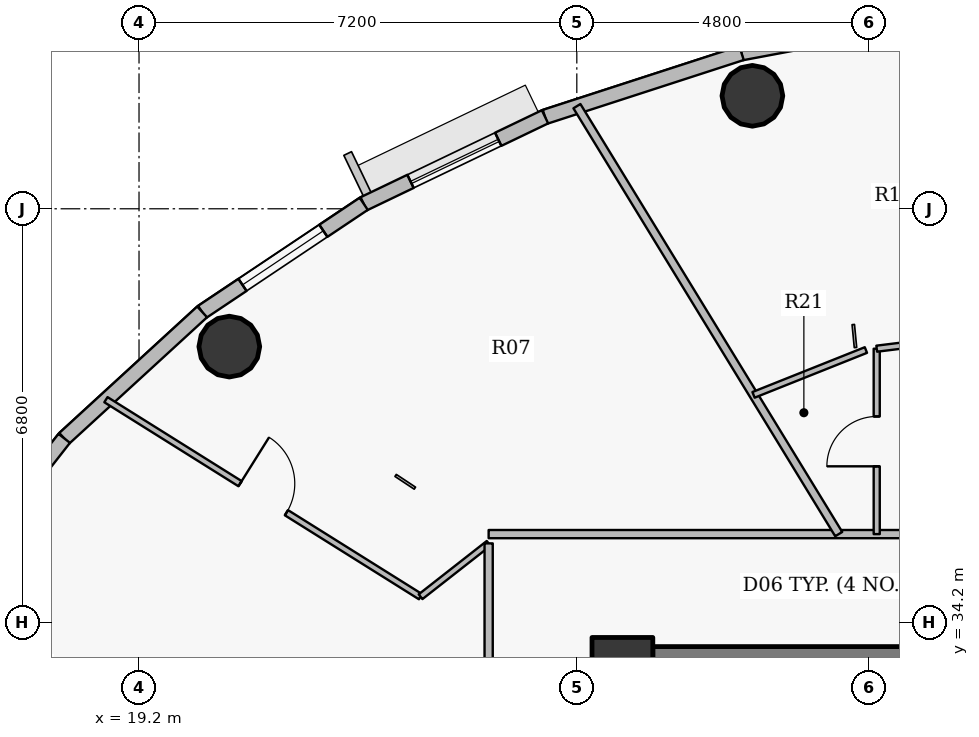
"""IFC4 building model, lengths in metres.
Left out: names, types, materials, properties, quantities, classifications, styles, units other than length and angle.
Written with IfcOpenShell. Run it as: python <this file> out.ifc"""

import sys

from ifc_helpers import new_model, si_unit, direction, frame, frame_2d, origin, origin_2d, place, context, subcontext, project, spatial, rectangle, hollow_circle, extrude, source, transform, mapped, element, fill, save


model = new_model("IFC4")
c1 = context("Model", 3, precision=1e-05, world=origin(), true_north=direction((0.0, 1.0)))
c2 = subcontext(c1, "Body", "Model", "MODEL_VIEW")
j1 = project(units=[si_unit("LENGTHUNIT", "METRE"), si_unit("PLANEANGLEUNIT", "RADIAN")], contexts=[c1])
p1 = place(None, origin())
s1 = spatial("IfcSite", under=j1, at=p1, CompositionType="ELEMENT")
p2 = place(p1, origin())
s2 = spatial("IfcBuilding", under=s1, at=p2, CompositionType="ELEMENT")
p3 = place(p2, frame((0.0, 0.0, 288.0)))
s3 = spatial("IfcBuildingStorey", under=s2, at=p3, CompositionType="ELEMENT", Elevation=288.0)
p4 = place(p3, frame((27.15, 33.45, 0.0), z_axis=(0.0, 0.0, 1.0), x_axis=(1.0, 0.0, 0.0)))
e1 = element("IfcColumn", 1, at=p4, inside=s3, PredefinedType="COLUMN", context=c2, shape_type="SweptSolid", body=[
    extrude(rectangle(XDim=1.0, YDim=1.0, at=origin_2d()), origin(), (0.0, 0.0, 1.0), 3.75),
])
p5 = place(p3, frame((27.65, 33.45, 0.0), z_axis=(0.0, 0.0, 1.0), x_axis=(1.0, 0.0, 0.0)))
e2 = element("IfcWall", 2, at=p5, inside=s3, PredefinedType="SHEAR", context=c2, shape_type="SweptSolid", body=[
    extrude(rectangle(XDim=16.7, YDim=0.7, at=frame_2d((8.35, 0.0))), origin(), (0.0, 0.0, 1.0), 3.05),
])
p6 = place(p5, frame((12.775, 0.0, 0.0)))
e3 = element("IfcOpeningElement", 3, at=p6, cuts=e2, PredefinedType="OPENING", context=c2, shape_type="SweptSolid", body=[
    extrude(rectangle(XDim=1.15, YDim=2.15, at=origin_2d()), frame((0.575, 0.36, 1.075), z_axis=(0.0, -1.0, 0.0), x_axis=(1.0, 0.0, 0.0)), (0.0, 0.0, 1.0), 0.72),
])
for number, where, z_axis, x_axis in (
    (4, (29.288, 42.858, 0.0), (0.0, 0.0, 1.0), (1.0, 0.0, 0.0)),
    (5, (20.685, 38.733, 0.0), (0.0, 0.0, 1.0), (1.0, 0.0, 0.0)),
):
    element("IfcColumn", number, at=place(p3, frame(where, z_axis=z_axis, x_axis=x_axis)), inside=s3, PredefinedType="COLUMN", context=c2, shape_type="SweptSolid", body=[
        extrude(hollow_circle(Radius=0.5, WallThickness=0.032, at=origin_2d()), origin(), (0.0, 0.0, 1.0), 3.75),
    ])
p7 = place(p3, frame((29.109, 43.56, 0.0), z_axis=(0.0, 0.0, 1.0), x_axis=(0.982782655757, 0.184765395959, 0.0)))
e6 = element("IfcWall", 6, at=p7, inside=s3, PredefinedType="SOLIDWALL", context=c2, shape_type="SweptSolid", body=[
    extrude(rectangle(XDim=3.462, YDim=0.24, at=frame_2d((1.731, 0.0))), origin(), (0.0, 0.0, 1.0), 3.5),
])
p8 = place(p7, frame((1.106, 0.0, 0.9)))
e7 = element("IfcOpeningElement", 7, at=p8, cuts=e6, PredefinedType="OPENING", context=c2, shape_type="SweptSolid", body=[
    extrude(rectangle(XDim=1.25, YDim=1.65, at=origin_2d()), frame((0.625, 0.13, 0.825), z_axis=(0.0, -1.0, 0.0), x_axis=(1.0, 0.0, 0.0)), (0.0, 0.0, 1.0), 0.26),
])
p9 = place(p3, frame((25.877, 42.512, 0.0), z_axis=(0.0, 0.0, 1.0), x_axis=(0.95123136723, 0.308478339592, 0.0)))
e8 = element("IfcWall", 8, at=p9, inside=s3, PredefinedType="SOLIDWALL", context=c2, shape_type="SweptSolid", body=[
    extrude(rectangle(XDim=3.398, YDim=0.24, at=frame_2d((1.699, 0.0))), origin(), (0.0, 0.0, 1.0), 3.5),
])
p10 = place(p3, frame((22.896, 41.082, 0.0), z_axis=(0.0, 0.0, 1.0), x_axis=(0.901573741254, 0.43262546051, 0.0)))
e9 = element("IfcWall", 9, at=p10, inside=s3, PredefinedType="SOLIDWALL", context=c2, shape_type="SweptSolid", body=[
    extrude(rectangle(XDim=3.307, YDim=0.24, at=frame_2d((1.653, 0.0))), origin(), (0.0, 0.0, 1.0), 3.5),
])
p11 = place(p10, frame((0.854, 0.0, 0.9)))
e10 = element("IfcOpeningElement", 10, at=p11, cuts=e9, PredefinedType="OPENING", context=c2, shape_type="SweptSolid", body=[
    extrude(rectangle(XDim=1.6, YDim=1.75, at=origin_2d()), frame((0.8, 0.13, 0.875), z_axis=(0.0, -1.0, 0.0), x_axis=(1.0, 0.0, 0.0)), (0.0, 0.0, 1.0), 0.26),
])
p12 = place(p3, frame((20.238, 39.304, 0.0), z_axis=(0.0, 0.0, 1.0), x_axis=(0.831250592635, 0.55589787933, 0.0)))
e11 = element("IfcWall", 11, at=p12, inside=s3, PredefinedType="SOLIDWALL", context=c2, shape_type="SweptSolid", body=[
    extrude(rectangle(XDim=3.197, YDim=0.24, at=frame_2d((1.599, 0.0))), origin(), (0.0, 0.0, 1.0), 3.5),
])
p13 = place(p12, frame((0.799, 0.0, 0.9)))
e12 = element("IfcOpeningElement", 12, at=p13, cuts=e11, PredefinedType="OPENING", context=c2, shape_type="SweptSolid", body=[
    extrude(rectangle(XDim=1.6, YDim=1.75, at=origin_2d()), frame((0.8, 0.13, 0.875), z_axis=(0.0, -1.0, 0.0), x_axis=(1.0, 0.0, 0.0)), (0.0, 0.0, 1.0), 0.26),
])
p14 = place(p3, frame((17.97, 37.225, 0.0), z_axis=(0.0, 0.0, 1.0), x_axis=(0.737068506972, 0.675818034703, 0.0)))
e13 = element("IfcWall", 13, at=p14, inside=s3, PredefinedType="SOLIDWALL", context=c2, shape_type="SweptSolid", body=[
    extrude(rectangle(XDim=3.077, YDim=0.24, at=frame_2d((1.539, 0.0))), origin(), (0.0, 0.0, 1.0), 3.5),
])
p15 = place(p3, frame((16.146, 34.895, 0.0), z_axis=(0.0, 0.0, 1.0), x_axis=(0.616337186556, 0.787482363275, 0.0)))
e14 = element("IfcWall", 14, at=p15, inside=s3, PredefinedType="SOLIDWALL", context=c2, shape_type="SweptSolid", body=[
    extrude(rectangle(XDim=2.958, YDim=0.24, at=frame_2d((1.479, 0.0))), origin(), (0.0, 0.0, 1.0), 3.5),
])
p16 = place(p15, frame((0.854, 0.0, 0.9)))
e15 = element("IfcOpeningElement", 15, at=p16, cuts=e14, PredefinedType="OPENING", context=c2, shape_type="SweptSolid", body=[
    extrude(rectangle(XDim=1.25, YDim=1.65, at=origin_2d()), frame((0.625, 0.13, 0.825), z_axis=(0.0, -1.0, 0.0), x_axis=(1.0, 0.0, 0.0)), (0.0, 0.0, 1.0), 0.26),
])
p17 = place(p3, frame((18.656, 37.861, 0.0), z_axis=(0.0, 0.0, 1.0), x_axis=(0.847553170054, -0.530710489751, 0.0)))
e16 = element("IfcWall", 16, at=p17, inside=s3, PredefinedType="PARTITIONING", context=c2, shape_type="SweptSolid", body=[
    extrude(rectangle(XDim=6.105, YDim=0.1, at=frame_2d((3.052, 0.0))), origin(), (0.0, 0.0, 1.0), 2.985),
])
p18 = place(p17, frame((2.603, 0.0, 0.0)))
e17 = element("IfcOpeningElement", 17, at=p18, cuts=e16, PredefinedType="OPENING", context=c2, shape_type="SweptSolid", body=[
    extrude(rectangle(XDim=0.9, YDim=2.1, at=origin_2d()), frame((0.45, 0.06, 1.05), z_axis=(0.0, -1.0, 0.0), x_axis=(1.0, 0.0, 0.0)), (0.0, 0.0, 1.0), 0.12),
])
p19 = place(p3, frame((23.83, 34.621, 0.0), z_axis=(0.0, 0.0, 1.0), x_axis=(0.787407186809, 0.616433226037, 0.0)))
e18 = element("IfcWall", 18, at=p19, inside=s3, PredefinedType="PARTITIONING", context=c2, shape_type="SweptSolid", body=[
    extrude(rectangle(XDim=1.422, YDim=0.1, at=frame_2d((0.711, 0.0))), origin(), (0.0, 0.0, 1.0), 3.035),
])
p20 = place(p3, frame((24.95, 18.35, 0.0), z_axis=(0.0, 0.0, 1.0), x_axis=(0.0, 1.0, 0.0)))
e19 = element("IfcWall", 19, at=p20, inside=s3, PredefinedType="PARTITIONING", context=c2, shape_type="SweptSolid", body=[
    extrude(rectangle(XDim=17.147, YDim=0.135, at=frame_2d((8.574, 0.0))), origin(), (0.0, 0.0, 1.0), 3.035),
])
p21 = place(p20, frame((10.267, 0.0, 0.0)))
e20 = element("IfcOpeningElement", 20, at=p21, cuts=e19, PredefinedType="OPENING", context=c2, shape_type="SweptSolid", body=[
    extrude(rectangle(XDim=1.0, YDim=2.15, at=origin_2d()), frame((0.5, 0.078, 1.075), z_axis=(0.0, -1.0, 0.0), x_axis=(1.0, 0.0, 0.0)), (0.0, 0.0, 1.0), 0.155),
])
p22 = place(p3, frame((24.95, 35.65, 0.0), z_axis=(0.0, 0.0, 1.0), x_axis=(1.0, 0.0, 0.0)))
e21 = element("IfcWall", 21, at=p22, inside=s3, PredefinedType="PARTITIONING", context=c2, shape_type="SweptSolid", body=[
    extrude(rectangle(XDim=10.1, YDim=0.135, at=frame_2d((5.05, 0.0))), origin(), (0.0, 0.0, 1.0), 3.035),
])
p23 = place(p3, frame((26.402, 42.688, 0.0), z_axis=(0.0, 0.0, 1.0), x_axis=(0.521891606098, -0.853011812043, 0.0)))
e22 = element("IfcWall", 22, at=p23, inside=s3, PredefinedType="PARTITIONING", context=c2, shape_type="SweptSolid", body=[
    extrude(rectangle(XDim=8.25, YDim=0.135, at=frame_2d((4.125, 0.0))), origin(), (0.0, 0.0, 1.0), 2.985),
])
p24 = place(p3, frame((29.307, 37.94, 0.0), z_axis=(0.0, 0.0, 1.0), x_axis=(0.928797929692, 0.370586569913, 0.0)))
e23 = element("IfcWall", 23, at=p24, inside=s3, PredefinedType="PARTITIONING", context=c2, shape_type="SweptSolid", body=[
    extrude(rectangle(XDim=1.99, YDim=0.1, at=frame_2d((0.995, 0.0))), origin(), (0.0, 0.0, 1.0), 3.035),
])
p25 = place(p3, frame((31.333, 35.65, 0.0), z_axis=(0.0, 0.0, 1.0), x_axis=(0.0, 1.0, 0.0)))
e24 = element("IfcWall", 24, at=p25, inside=s3, PredefinedType="PARTITIONING", context=c2, shape_type="SweptSolid", body=[
    extrude(rectangle(XDim=3.049, YDim=0.1, at=frame_2d((1.525, 0.0))), origin(), (0.0, 0.0, 1.0), 3.035),
])
p26 = place(p25, frame((1.115, 0.0, 0.0)))
e25 = element("IfcOpeningElement", 25, at=p26, cuts=e24, PredefinedType="OPENING", context=c2, shape_type="SweptSolid", body=[
    extrude(rectangle(XDim=0.82, YDim=2.1, at=origin_2d()), frame((0.41, 0.06, 1.05), z_axis=(0.0, -1.0, 0.0), x_axis=(1.0, 0.0, 0.0)), (0.0, 0.0, 1.0), 0.12),
])
p27 = place(p3, frame((31.333, 38.699, 0.0), z_axis=(0.0, 0.0, 1.0), x_axis=(0.992398193069, 0.123068380965, 0.0)))
e26 = element("IfcWall", 26, at=p27, inside=s3, PredefinedType="PARTITIONING", context=c2, shape_type="SweptSolid", body=[
    extrude(rectangle(XDim=3.638, YDim=0.1, at=frame_2d((1.819, 0.0))), origin(), (0.0, 0.0, 1.0), 2.985),
])
p28 = place(p3, frame((27.64, 33.8, 0.0), z_axis=(0.0, 0.0, 1.0), x_axis=(-1.0, 0.0, 0.0)))
e27 = element("IfcWall", 27, at=p28, inside=s3, PredefinedType="PARTITIONING", context=c2, shape_type="SweptSolid", body=[
    extrude(rectangle(XDim=0.84, YDim=0.135, at=frame_2d((0.42, 0.0))), origin(), (0.0, 0.0, 1.0), 3.035),
])
m1 = source(origin(), c2, "Body", "SweptSolid", [
    extrude(rectangle(XDim=1.6, YDim=1.75, at=origin_2d()), frame((0.8, 0.03, 0.875), z_axis=(0.0, -1.0, 0.0), x_axis=(1.0, 0.0, 0.0)), (0.0, 0.0, 1.0), 0.06),
])
p29 = place(p11, origin())
e28 = element("IfcWindow", 28, at=p29, inside=s3, PartitioningType="DOUBLE_PANEL_VERTICAL", PredefinedType="WINDOW", context=c2, shape_type="MappedRepresentation", body=[
    mapped(m1, transform((0.0, 0.0, 0.0), x_axis=(1.0, 0.0, 0.0), y_axis=(0.0, 1.0, 0.0), z_axis=(0.0, 0.0, 1.0), scale=1.0)),
])
fill(e10, e28)
p30 = place(p13, origin())
e29 = element("IfcWindow", 29, at=p30, inside=s3, PartitioningType="DOUBLE_PANEL_VERTICAL", PredefinedType="WINDOW", context=c2, shape_type="MappedRepresentation", body=[
    mapped(m1, transform((0.0, 0.0, 0.0), x_axis=(1.0, 0.0, 0.0), y_axis=(0.0, 1.0, 0.0), z_axis=(0.0, 0.0, 1.0), scale=1.0)),
])
fill(e12, e29)
m2 = source(origin(), c2, "Body", "SweptSolid", [
    extrude(rectangle(XDim=0.82, YDim=2.1, at=origin_2d()), frame((0.41, 0.025, 1.05), z_axis=(0.0, -1.0, 0.0), x_axis=(1.0, 0.0, 0.0)), (0.0, 0.0, 1.0), 0.05),
])
p31 = place(p26, origin())
e30 = element("IfcDoor", 30, at=p31, inside=s3, OperationType="SINGLE_SWING_LEFT", PredefinedType="DOOR", context=c2, shape_type="MappedRepresentation", body=[
    mapped(m2, transform((0.0, 0.0, 0.0), x_axis=(1.0, 0.0, 0.0), y_axis=(0.0, 1.0, 0.0), z_axis=(0.0, 0.0, 1.0), scale=1.0)),
])
fill(e25, e30)
m3 = source(origin(), c2, "Body", "SweptSolid", [
    extrude(rectangle(XDim=0.9, YDim=2.1, at=origin_2d()), frame((0.45, 0.025, 1.05), z_axis=(0.0, -1.0, 0.0), x_axis=(1.0, 0.0, 0.0)), (0.0, 0.0, 1.0), 0.05),
])
p32 = place(p18, origin())
e31 = element("IfcDoor", 31, at=p32, inside=s3, OperationType="SINGLE_SWING_LEFT", PredefinedType="DOOR", context=c2, shape_type="MappedRepresentation", body=[
    mapped(m3, transform((0.0, 0.0, 0.0), x_axis=(1.0, 0.0, 0.0), y_axis=(0.0, 1.0, 0.0), z_axis=(0.0, 0.0, 1.0), scale=1.0)),
])
fill(e17, e31)
save(model, sys.argv[1])
